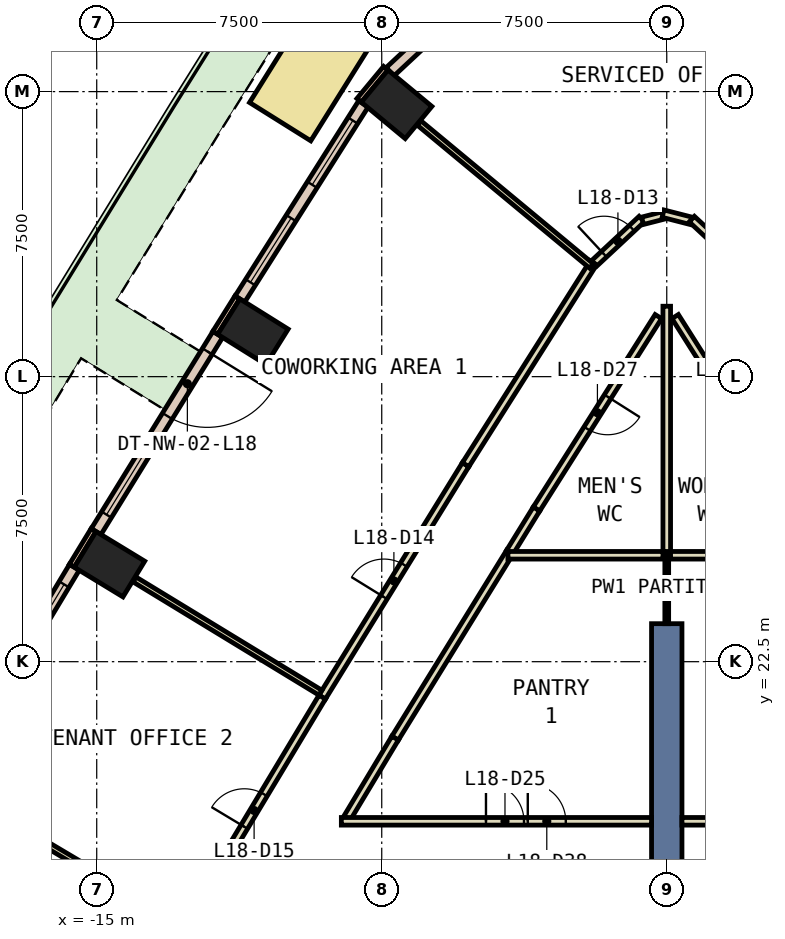
"""IFC4 building model, lengths in metres.
Left out: names, types, materials, properties, quantities, classifications, styles, units other than length and angle.
Written with IfcOpenShell. Run it as: python <this file> out.ifc"""

import sys

from ifc_helpers import new_model, si_unit, direction, frame, frame_2d, origin, origin_2d, place, context, subcontext, project, spatial, rectangle, extrude, element, fill, save


model = new_model("IFC4")
c1 = context("Model", 3, precision=1e-05, world=origin(), true_north=direction((0.0, 1.0)))
c2 = subcontext(c1, "Body", "Model", "MODEL_VIEW")
j1 = project(units=[si_unit("LENGTHUNIT", "METRE"), si_unit("PLANEANGLEUNIT", "RADIAN")], contexts=[c1])
p1 = place(None, origin())
s1 = spatial("IfcSite", under=j1, at=p1, CompositionType="ELEMENT")
p2 = place(p1, origin())
s2 = spatial("IfcBuilding", under=s1, at=p2, CompositionType="ELEMENT")
p3 = place(p2, frame((0.0, 0.0, 86.6)))
s3 = spatial("IfcBuildingStorey", under=s2, at=p3, CompositionType="ELEMENT", Elevation=86.6)
for number, where, z_axis, x_axis in (
    (1, (-7.109, 37.166, 0.0), (0.0, 0.0, 1.0), (0.638, 0.77, 0.0)),
    (2, (-10.89, 31.182, 0.0), (0.0, 0.0, 1.0), (0.53, 0.848, 0.0)),
    (3, (-14.664, 25.065, 0.0), (0.0, 0.0, 1.0), (0.52, 0.854, 0.0)),
):
    element("IfcColumn", number, at=place(p3, frame(where, z_axis=z_axis, x_axis=x_axis)), inside=s3, PredefinedType="COLUMN", context=c2, shape_type="SweptSolid", body=[
        extrude(rectangle(XDim=1.1, YDim=1.5, at=origin_2d()), origin(), (0.0, 0.0, 1.0), 3.8),
    ])
p4 = place(p3, frame((0.0, 14.5, -0.6), z_axis=(0.0, 0.0, 1.0), x_axis=(0.0, 1.0, 0.0)))
e4 = element("IfcWall", 4, at=p4, inside=s3, PredefinedType="SHEAR", context=c2, shape_type="SweptSolid", body=[
    extrude(rectangle(XDim=9.0, YDim=0.8, at=frame_2d((4.5, 0.0))), origin(), (0.0, 0.0, 1.0), 4.4),
])
p5 = place(p3, frame((-7.393, 38.116, 0.0), z_axis=(0.0, 0.0, 1.0), x_axis=(-0.638544483078, -0.769584916127, 0.0)))
e5 = element("IfcWall", 5, at=p5, inside=s3, PredefinedType="STANDARD", context=c2, shape_type="SweptSolid", body=[
    extrude(rectangle(XDim=1.099, YDim=0.15, at=frame_2d((0.55, 0.0))), origin(), (0.0, 0.0, 1.0), 3.8),
])
p6 = place(p3, frame((-11.298, 32.086, 0.0), z_axis=(0.0, 0.0, 1.0), x_axis=(-0.52997899071, -0.848010771987, 0.0)))
e6 = element("IfcWall", 6, at=p6, inside=s3, PredefinedType="STANDARD", context=c2, shape_type="SweptSolid", body=[
    extrude(rectangle(XDim=1.1, YDim=0.15, at=frame_2d((0.55, 0.0))), origin(), (0.0, 0.0, 1.0), 3.8),
])
p7 = place(p3, frame((-15.083, 25.964, 0.0), z_axis=(0.0, 0.0, 1.0), x_axis=(-0.51977099384, -0.854305632641, 0.0)))
e7 = element("IfcWall", 7, at=p7, inside=s3, PredefinedType="STANDARD", context=c2, shape_type="SweptSolid", body=[
    extrude(rectangle(XDim=1.101, YDim=0.15, at=frame_2d((0.55, 0.0))), origin(), (0.0, 0.0, 1.0), 3.8),
])
p8 = place(p3, frame((-4.786, 40.347, 0.0), z_axis=(0.0, 0.0, 1.0), x_axis=(-0.731614451791, -0.681718632525, 0.0)))
e8 = element("IfcWall", 8, at=p8, inside=s3, PredefinedType="STANDARD", context=c2, shape_type="SweptSolid", body=[
    extrude(rectangle(XDim=3.41, YDim=0.3, at=frame_2d((1.705, 0.0))), origin(), (0.0, 0.0, 1.0), 3.8),
])
p9 = place(p8, frame((1.005, 0.0, 0.9)))
e9 = element("IfcOpeningElement", 9, at=p9, cuts=e8, PredefinedType="OPENING", context=c2, shape_type="SweptSolid", body=[
    extrude(rectangle(XDim=1.4, YDim=2.6, at=frame_2d((0.7, 1.3))), frame((0.0, 0.16, 0.0), z_axis=(0.0, -1.0, 0.0), x_axis=(1.0, 0.0, 0.0)), (0.0, 0.0, 1.0), 0.32),
])
p10 = place(p3, frame((-7.982, 37.177, 0.0), z_axis=(0.0, 0.0, 1.0), x_axis=(-0.534869492536, -0.84493468739, 0.0)))
e10 = element("IfcWall", 10, at=p10, inside=s3, PredefinedType="STANDARD", context=c2, shape_type="SweptSolid", body=[
    extrude(rectangle(XDim=6.076, YDim=0.3, at=frame_2d((3.038, 0.0))), origin(), (0.0, 0.0, 1.0), 3.8),
])
p11 = place(p10, frame((0.519, 0.0, 0.9)))
e11 = element("IfcOpeningElement", 11, at=p11, cuts=e10, PredefinedType="OPENING", context=c2, shape_type="SweptSolid", body=[
    extrude(rectangle(XDim=2.0, YDim=2.6, at=frame_2d((1.0, 1.3))), frame((0.0, 0.16, 0.0), z_axis=(0.0, -1.0, 0.0), x_axis=(1.0, 0.0, 0.0)), (0.0, 0.0, 1.0), 0.32),
])
p12 = place(p10, frame((3.557, 0.0, 0.9)))
e12 = element("IfcOpeningElement", 12, at=p12, cuts=e10, PredefinedType="OPENING", context=c2, shape_type="SweptSolid", body=[
    extrude(rectangle(XDim=2.0, YDim=2.6, at=frame_2d((1.0, 1.3))), frame((0.0, 0.16, 0.0), z_axis=(0.0, -1.0, 0.0), x_axis=(1.0, 0.0, 0.0)), (0.0, 0.0, 1.0), 0.32),
])
p13 = place(p3, frame((-11.814, 31.112, 0.0), z_axis=(0.0, 0.0, 1.0), x_axis=(-0.525204788886, -0.850975869065, 0.0)))
e13 = element("IfcWall", 13, at=p13, inside=s3, PredefinedType="STANDARD", context=c2, shape_type="SweptSolid", body=[
    extrude(rectangle(XDim=6.099, YDim=0.3, at=frame_2d((3.049, 0.0))), origin(), (0.0, 0.0, 1.0), 3.8),
])
p14 = place(p13, frame((0.525, 0.0, 0.0)))
e14 = element("IfcOpeningElement", 14, at=p14, cuts=e13, PredefinedType="OPENING", context=c2, shape_type="SweptSolid", body=[
    extrude(rectangle(XDim=2.0, YDim=2.4, at=frame_2d((1.0, 1.2))), frame((0.0, 0.16, 0.0), z_axis=(0.0, -1.0, 0.0), x_axis=(1.0, 0.0, 0.0)), (0.0, 0.0, 1.0), 0.32),
])
p15 = place(p13, frame((3.574, 0.0, 0.9)))
e15 = element("IfcOpeningElement", 15, at=p15, cuts=e13, PredefinedType="OPENING", context=c2, shape_type="SweptSolid", body=[
    extrude(rectangle(XDim=2.0, YDim=2.6, at=frame_2d((1.0, 1.3))), frame((0.0, 0.16, 0.0), z_axis=(0.0, -1.0, 0.0), x_axis=(1.0, 0.0, 0.0)), (0.0, 0.0, 1.0), 0.32),
])
p16 = place(p3, frame((-15.588, 24.984, 0.0), z_axis=(0.0, 0.0, 1.0), x_axis=(-0.515102053092, -0.857128855483, 0.0)))
e16 = element("IfcWall", 16, at=p16, inside=s3, PredefinedType="STANDARD", context=c2, shape_type="SweptSolid", body=[
    extrude(rectangle(XDim=6.098, YDim=0.3, at=frame_2d((3.049, 0.0))), origin(), (0.0, 0.0, 1.0), 3.8),
])
p17 = place(p16, frame((0.525, 0.0, 0.9)))
e17 = element("IfcOpeningElement", 17, at=p17, cuts=e16, PredefinedType="OPENING", context=c2, shape_type="SweptSolid", body=[
    extrude(rectangle(XDim=2.0, YDim=2.6, at=frame_2d((1.0, 1.3))), frame((0.0, 0.16, 0.0), z_axis=(0.0, -1.0, 0.0), x_axis=(1.0, 0.0, 0.0)), (0.0, 0.0, 1.0), 0.32),
])
p18 = place(p16, frame((3.574, 0.0, 0.9)))
e18 = element("IfcOpeningElement", 18, at=p18, cuts=e16, PredefinedType="OPENING", context=c2, shape_type="SweptSolid", body=[
    extrude(rectangle(XDim=2.0, YDim=2.6, at=frame_2d((1.0, 1.3))), frame((0.0, 0.16, 0.0), z_axis=(0.0, -1.0, 0.0), x_axis=(1.0, 0.0, 0.0)), (0.0, 0.0, 1.0), 0.32),
])
p19 = place(p3, frame((-7.363, 41.2, 0.0), z_axis=(0.0, 0.0, 1.0), x_axis=(-0.530433826126, -0.847726345056, 0.0)))
e19 = element("IfcWall", 19, at=p19, inside=s3, PredefinedType="STANDARD", context=c2, shape_type="SweptSolid", body=[
    extrude(rectangle(XDim=5.298, YDim=1.9, at=frame_2d((2.649, 0.0))), origin(), (0.0, 0.0, 1.0), 0.8),
])
p20 = place(p3, frame((-4.126, 25.385, 0.0), z_axis=(0.0, 0.0, 1.0), x_axis=(-0.525162244663, -0.851002125016, 0.0)))
e20 = element("IfcWall", 20, at=p20, inside=s3, PredefinedType="PARTITIONING", context=c2, shape_type="SweptSolid", body=[
    extrude(rectangle(XDim=5.754, YDim=0.2, at=frame_2d((2.877, 0.0))), origin(), (0.0, 0.0, 1.0), 3.8),
])
p21 = place(p3, frame((-7.148, 20.488, 0.0), z_axis=(0.0, 0.0, 1.0), x_axis=(-0.515008089027, -0.857185317325, 0.0)))
e21 = element("IfcWall", 21, at=p21, inside=s3, PredefinedType="PARTITIONING", context=c2, shape_type="SweptSolid", body=[
    extrude(rectangle(XDim=2.452, YDim=0.2, at=frame_2d((1.226, 0.0))), origin(), (0.0, 0.0, 1.0), 3.8),
])
p22 = place(p3, frame((3.428, 26.517, 0.0), z_axis=(0.0, 0.0, 1.0), x_axis=(-0.535034639024, 0.844830122003, 0.0)))
e22 = element("IfcWall", 22, at=p22, inside=s3, PredefinedType="PARTITIONING", context=c2, shape_type="SweptSolid", body=[
    extrude(rectangle(XDim=5.994, YDim=0.2, at=frame_2d((2.997, 0.0))), origin(), (0.0, 0.0, 1.0), 3.8),
])
p23 = place(p22, frame((2.497, 0.0, 0.0)))
e23 = element("IfcOpeningElement", 23, at=p23, cuts=e22, PredefinedType="OPENING", context=c2, shape_type="SweptSolid", body=[
    extrude(rectangle(XDim=1.0, YDim=2.1, at=frame_2d((0.5, 1.05))), frame((0.0, 0.11, 0.0), z_axis=(0.0, -1.0, 0.0), x_axis=(1.0, 0.0, 0.0)), (0.0, 0.0, 1.0), 0.22),
])
p24 = place(p3, frame((-0.221, 31.581, 0.0), z_axis=(0.0, 0.0, 1.0), x_axis=(-0.535034639024, -0.844830122003, 0.0)))
e24 = element("IfcWall", 24, at=p24, inside=s3, PredefinedType="PARTITIONING", context=c2, shape_type="SweptSolid", body=[
    extrude(rectangle(XDim=5.994, YDim=0.2, at=frame_2d((2.997, 0.0))), origin(), (0.0, 0.0, 1.0), 3.8),
])
p25 = place(p24, frame((2.497, 0.0, 0.0)))
e25 = element("IfcOpeningElement", 25, at=p25, cuts=e24, PredefinedType="OPENING", context=c2, shape_type="SweptSolid", body=[
    extrude(rectangle(XDim=1.0, YDim=2.1, at=frame_2d((0.5, 1.05))), frame((0.0, 0.11, 0.0), z_axis=(0.0, -1.0, 0.0), x_axis=(1.0, 0.0, 0.0)), (0.0, 0.0, 1.0), 0.22),
])
p26 = place(p3, frame((-3.428, 26.517, 0.0), z_axis=(0.0, 0.0, 1.0), x_axis=(-0.524824420869, -0.851210507019, 0.0)))
e26 = element("IfcWall", 26, at=p26, inside=s3, PredefinedType="PARTITIONING", context=c2, shape_type="SweptSolid", body=[
    extrude(rectangle(XDim=1.33, YDim=0.2, at=frame_2d((0.665, 0.0))), origin(), (0.0, 0.0, 1.0), 3.8),
])
p27 = place(p3, frame((-1.909, 32.981, 0.0), z_axis=(0.0, 0.0, 1.0), x_axis=(0.731549606095, 0.681788217721, 0.0)))
e27 = element("IfcWall", 27, at=p27, inside=s3, PredefinedType="PARTITIONING", context=c2, shape_type="SweptSolid", body=[
    extrude(rectangle(XDim=1.707, YDim=0.2, at=frame_2d((0.854, 0.0))), origin(), (0.0, 0.0, 1.0), 3.8),
])
p28 = place(p27, frame((0.353, 0.0, 0.0)))
e28 = element("IfcOpeningElement", 28, at=p28, cuts=e27, PredefinedType="OPENING", context=c2, shape_type="SweptSolid", body=[
    extrude(rectangle(XDim=1.0, YDim=2.1, at=frame_2d((0.5, 1.05))), frame((0.0, 0.11, 0.0), z_axis=(0.0, -1.0, 0.0), x_axis=(1.0, 0.0, 0.0)), (0.0, 0.0, 1.0), 0.22),
])
p29 = place(p3, frame((-0.637, 34.101, 0.0), z_axis=(0.0, 0.0, 1.0), x_axis=(0.968893133717, 0.247479484878, 0.0)))
e29 = element("IfcWall", 29, at=p29, inside=s3, PredefinedType="PARTITIONING", context=c2, shape_type="SweptSolid", body=[
    extrude(rectangle(XDim=0.557, YDim=0.2, at=frame_2d((0.279, 0.0))), origin(), (0.0, 0.0, 1.0), 3.8),
])
p30 = place(p3, frame((-0.097, 34.289, 0.0), z_axis=(0.0, 0.0, 1.0), x_axis=(0.96872347969, -0.248142740972, 0.0)))
e30 = element("IfcWall", 30, at=p30, inside=s3, PredefinedType="PARTITIONING", context=c2, shape_type="SweptSolid", body=[
    extrude(rectangle(XDim=0.758, YDim=0.2, at=frame_2d((0.379, 0.0))), origin(), (0.0, 0.0, 1.0), 3.8),
])
p31 = place(p3, frame((0.66, 34.145, 0.0), z_axis=(0.0, 0.0, 1.0), x_axis=(0.731549606095, -0.681788217721, 0.0)))
e31 = element("IfcWall", 31, at=p31, inside=s3, PredefinedType="PARTITIONING", context=c2, shape_type="SweptSolid", body=[
    extrude(rectangle(XDim=1.707, YDim=0.2, at=frame_2d((0.854, 0.0))), origin(), (0.0, 0.0, 1.0), 3.8),
])
p32 = place(p3, frame((-9.067, 21.568, 0.0), z_axis=(0.0, 0.0, 1.0), x_axis=(0.525131931126, 0.851020831068, 0.0)))
e32 = element("IfcWall", 32, at=p32, inside=s3, PredefinedType="PARTITIONING", context=c2, shape_type="SweptSolid", body=[
    extrude(rectangle(XDim=7.187, YDim=0.2, at=frame_2d((3.593, 0.0))), origin(), (0.0, 0.0, 1.0), 3.8),
])
p33 = place(p32, frame((3.093, 0.0, 0.0)))
e33 = element("IfcOpeningElement", 33, at=p33, cuts=e32, PredefinedType="OPENING", context=c2, shape_type="SweptSolid", body=[
    extrude(rectangle(XDim=1.0, YDim=2.1, at=frame_2d((0.5, 1.05))), frame((0.0, 0.11, 0.0), z_axis=(0.0, -1.0, 0.0), x_axis=(1.0, 0.0, 0.0)), (0.0, 0.0, 1.0), 0.22),
])
p34 = place(p3, frame((-5.293, 27.684, 0.0), z_axis=(0.0, 0.0, 1.0), x_axis=(0.534952324147, 0.844882246759, 0.0)))
e34 = element("IfcWall", 34, at=p34, inside=s3, PredefinedType="PARTITIONING", context=c2, shape_type="SweptSolid", body=[
    extrude(rectangle(XDim=6.288, YDim=0.2, at=frame_2d((3.144, 0.0))), origin(), (0.0, 0.0, 1.0), 3.8),
])
p35 = place(p3, frame((-12.728, 15.473, 0.0), z_axis=(0.0, 0.0, 1.0), x_axis=(0.515010673306, 0.857183764651, 0.0)))
e35 = element("IfcWall", 35, at=p35, inside=s3, PredefinedType="PARTITIONING", context=c2, shape_type="SweptSolid", body=[
    extrude(rectangle(XDim=7.111, YDim=0.2, at=frame_2d((3.555, 0.0))), origin(), (0.0, 0.0, 1.0), 3.8),
])
p36 = place(p35, frame((3.13, 0.0, 0.0)))
e36 = element("IfcOpeningElement", 36, at=p36, cuts=e35, PredefinedType="OPENING", context=c2, shape_type="SweptSolid", body=[
    extrude(rectangle(XDim=1.0, YDim=2.1, at=frame_2d((0.5, 1.05))), frame((0.0, 0.11, 0.0), z_axis=(0.0, -1.0, 0.0), x_axis=(1.0, 0.0, 0.0)), (0.0, 0.0, 1.0), 0.22),
])
p37 = place(p3, frame((0.4, 18.3, 0.0), z_axis=(0.0, 0.0, 1.0), x_axis=(1.0, 0.0, 0.0)))
e37 = element("IfcWall", 37, at=p37, inside=s3, PredefinedType="PARTITIONING", context=c2, shape_type="SweptSolid", body=[
    extrude(rectangle(XDim=8.163, YDim=0.2, at=frame_2d((4.082, 0.0))), origin(), (0.0, 0.0, 1.0), 3.8),
])
p38 = place(p37, frame((3.356, 0.0, 0.0)))
e38 = element("IfcOpeningElement", 38, at=p38, cuts=e37, PredefinedType="OPENING", context=c2, shape_type="SweptSolid", body=[
    extrude(rectangle(XDim=1.0, YDim=2.1, at=frame_2d((0.5, 1.05))), frame((0.0, 0.11, 0.0), z_axis=(0.0, -1.0, 0.0), x_axis=(1.0, 0.0, 0.0)), (0.0, 0.0, 1.0), 0.22),
])
p39 = place(p37, frame((4.456, 0.0, 0.0)))
e39 = element("IfcOpeningElement", 39, at=p39, cuts=e37, PredefinedType="OPENING", context=c2, shape_type="SweptSolid", body=[
    extrude(rectangle(XDim=1.0, YDim=2.1, at=frame_2d((0.5, 1.05))), frame((0.0, 0.11, 0.0), z_axis=(0.0, -1.0, 0.0), x_axis=(1.0, 0.0, 0.0)), (0.0, 0.0, 1.0), 0.22),
])
p40 = place(p3, frame((-8.563, 18.3, 0.0), z_axis=(0.0, 0.0, 1.0), x_axis=(1.0, 0.0, 0.0)))
e40 = element("IfcWall", 40, at=p40, inside=s3, PredefinedType="PARTITIONING", context=c2, shape_type="SweptSolid", body=[
    extrude(rectangle(XDim=8.163, YDim=0.2, at=frame_2d((4.082, 0.0))), origin(), (0.0, 0.0, 1.0), 3.8),
])
p41 = place(p40, frame((3.806, 0.0, 0.0)))
e41 = element("IfcOpeningElement", 41, at=p41, cuts=e40, PredefinedType="OPENING", context=c2, shape_type="SweptSolid", body=[
    extrude(rectangle(XDim=1.0, YDim=2.1, at=frame_2d((0.5, 1.05))), frame((0.0, 0.11, 0.0), z_axis=(0.0, -1.0, 0.0), x_axis=(1.0, 0.0, 0.0)), (0.0, 0.0, 1.0), 0.22),
])
p42 = place(p40, frame((4.906, 0.0, 0.0)))
e42 = element("IfcOpeningElement", 42, at=p42, cuts=e40, PredefinedType="OPENING", context=c2, shape_type="SweptSolid", body=[
    extrude(rectangle(XDim=1.0, YDim=2.1, at=frame_2d((0.5, 1.05))), frame((0.0, 0.11, 0.0), z_axis=(0.0, -1.0, 0.0), x_axis=(1.0, 0.0, 0.0)), (0.0, 0.0, 1.0), 0.22),
])
p43 = place(p3, frame((0.0, 23.5, 0.0), z_axis=(0.0, 0.0, 1.0), x_axis=(0.0, 1.0, 0.0)))
e43 = element("IfcWall", 43, at=p43, inside=s3, PredefinedType="PARTITIONING", context=c2, shape_type="SweptSolid", body=[
    extrude(rectangle(XDim=1.9, YDim=0.1, at=frame_2d((0.95, 0.0))), origin(), (0.0, 0.0, 1.0), 3.8),
])
for number, where, z_axis, x_axis in (
    (44, (0.1, 25.3, 0.0), (0.0, 0.0, 1.0), (1.0, 0.0, 0.0)),
    (45, (-4.179, 25.3, 0.0), (0.0, 0.0, 1.0), (1.0, 0.0, 0.0)),
):
    element("IfcWall", number, at=place(p3, frame(where, z_axis=z_axis, x_axis=x_axis)), inside=s3, PredefinedType="PARTITIONING", context=c2, shape_type="SweptSolid", body=[
        extrude(rectangle(XDim=4.079, YDim=0.2, at=frame_2d((2.04, 0.0))), origin(), (0.0, 0.0, 1.0), 3.8),
    ])
p44 = place(p3, frame((0.0, 25.4, 0.0), z_axis=(0.0, 0.0, 1.0), x_axis=(0.0, 1.0, 0.0)))
e46 = element("IfcWall", 46, at=p44, inside=s3, PredefinedType="PARTITIONING", context=c2, shape_type="SweptSolid", body=[
    extrude(rectangle(XDim=6.453, YDim=0.2, at=frame_2d((3.227, 0.0))), origin(), (0.0, 0.0, 1.0), 3.8),
])
p45 = place(p3, frame((-1.982, 32.913, 0.0), z_axis=(0.0, 0.0, 1.0), x_axis=(-0.769679976891, 0.638429896835, 0.0)))
e47 = element("IfcWall", 47, at=p45, inside=s3, PredefinedType="PARTITIONING", context=c2, shape_type="SweptSolid", body=[
    extrude(rectangle(XDim=5.891, YDim=0.15, at=frame_2d((2.946, 0.0))), origin(), (0.0, 0.0, 1.0), 3.8),
])
p46 = place(p3, frame((-9.113, 21.684, 0.0), z_axis=(0.0, 0.0, 1.0), x_axis=(-0.854075097122, 0.520149717367, 0.0)))
e48 = element("IfcWall", 48, at=p46, inside=s3, PredefinedType="PARTITIONING", context=c2, shape_type="SweptSolid", body=[
    extrude(rectangle(XDim=5.729, YDim=0.15, at=frame_2d((2.865, 0.0))), origin(), (0.0, 0.0, 1.0), 3.8),
])
p47 = place(p3, frame((-12.776, 15.589, 0.0), z_axis=(0.0, 0.0, 1.0), x_axis=(-0.860225086153, 0.509914503768, 0.0)))
e49 = element("IfcWall", 49, at=p47, inside=s3, PredefinedType="PARTITIONING", context=c2, shape_type="SweptSolid", body=[
    extrude(rectangle(XDim=5.73, YDim=0.15, at=frame_2d((2.865, 0.0))), origin(), (0.0, 0.0, 1.0), 3.8),
])
p48 = place(p11, origin())
e50 = element("IfcWindow", 50, at=p48, inside=s3, PartitioningType="SINGLE_PANEL", PredefinedType="WINDOW", context=c2, shape_type="SweptSolid", body=[
    extrude(rectangle(XDim=2.0, YDim=2.6, at=frame_2d((1.0, 1.3))), frame((0.0, 0.03, 0.0), z_axis=(0.0, -1.0, 0.0), x_axis=(1.0, 0.0, 0.0)), (0.0, 0.0, 1.0), 0.06),
])
fill(e11, e50)
p49 = place(p12, origin())
e51 = element("IfcWindow", 51, at=p49, inside=s3, PartitioningType="SINGLE_PANEL", PredefinedType="WINDOW", context=c2, shape_type="SweptSolid", body=[
    extrude(rectangle(XDim=2.0, YDim=2.6, at=frame_2d((1.0, 1.3))), frame((0.0, 0.03, 0.0), z_axis=(0.0, -1.0, 0.0), x_axis=(1.0, 0.0, 0.0)), (0.0, 0.0, 1.0), 0.06),
])
fill(e12, e51)
p50 = place(p14, origin())
e52 = element("IfcDoor", 52, at=p50, inside=s3, OperationType="SLIDING_TO_LEFT", PredefinedType="DOOR", context=c2, shape_type="SweptSolid", body=[
    extrude(rectangle(XDim=2.0, YDim=2.4, at=frame_2d((1.0, 1.2))), frame((0.0, 0.025, 0.0), z_axis=(0.0, -1.0, 0.0), x_axis=(1.0, 0.0, 0.0)), (0.0, 0.0, 1.0), 0.05),
])
fill(e14, e52)
p51 = place(p15, origin())
e53 = element("IfcWindow", 53, at=p51, inside=s3, PartitioningType="SINGLE_PANEL", PredefinedType="WINDOW", context=c2, shape_type="SweptSolid", body=[
    extrude(rectangle(XDim=2.0, YDim=2.6, at=frame_2d((1.0, 1.3))), frame((0.0, 0.03, 0.0), z_axis=(0.0, -1.0, 0.0), x_axis=(1.0, 0.0, 0.0)), (0.0, 0.0, 1.0), 0.06),
])
fill(e15, e53)
p52 = place(p17, origin())
e54 = element("IfcWindow", 54, at=p52, inside=s3, PartitioningType="SINGLE_PANEL", PredefinedType="WINDOW", context=c2, shape_type="SweptSolid", body=[
    extrude(rectangle(XDim=2.0, YDim=2.6, at=frame_2d((1.0, 1.3))), frame((0.0, 0.03, 0.0), z_axis=(0.0, -1.0, 0.0), x_axis=(1.0, 0.0, 0.0)), (0.0, 0.0, 1.0), 0.06),
])
fill(e17, e54)
p53 = place(p28, origin())
e55 = element("IfcDoor", 55, at=p53, inside=s3, OperationType="SINGLE_SWING_RIGHT", PredefinedType="DOOR", context=c2, shape_type="SweptSolid", body=[
    extrude(rectangle(XDim=1.0, YDim=2.1, at=frame_2d((0.5, 1.05))), frame((0.0, 0.025, 0.0), z_axis=(0.0, -1.0, 0.0), x_axis=(1.0, 0.0, 0.0)), (0.0, 0.0, 1.0), 0.05),
])
fill(e28, e55)
p54 = place(p33, origin())
e56 = element("IfcDoor", 56, at=p54, inside=s3, OperationType="SINGLE_SWING_RIGHT", PredefinedType="DOOR", context=c2, shape_type="SweptSolid", body=[
    extrude(rectangle(XDim=1.0, YDim=2.1, at=frame_2d((0.5, 1.05))), frame((0.0, 0.025, 0.0), z_axis=(0.0, -1.0, 0.0), x_axis=(1.0, 0.0, 0.0)), (0.0, 0.0, 1.0), 0.05),
])
fill(e33, e56)
p55 = place(p36, origin())
e57 = element("IfcDoor", 57, at=p55, inside=s3, OperationType="SINGLE_SWING_LEFT", PredefinedType="DOOR", context=c2, shape_type="SweptSolid", body=[
    extrude(rectangle(XDim=1.0, YDim=2.1, at=frame_2d((0.5, 1.05))), frame((0.0, 0.025, 0.0), z_axis=(0.0, -1.0, 0.0), x_axis=(1.0, 0.0, 0.0)), (0.0, 0.0, 1.0), 0.05),
])
fill(e36, e57)
p56 = place(p41, origin())
e58 = element("IfcDoor", 58, at=p56, inside=s3, OperationType="SINGLE_SWING_RIGHT", PredefinedType="DOOR", context=c2, shape_type="SweptSolid", body=[
    extrude(rectangle(XDim=1.0, YDim=2.1, at=frame_2d((0.5, 1.05))), frame((0.0, 0.025, 0.0), z_axis=(0.0, -1.0, 0.0), x_axis=(1.0, 0.0, 0.0)), (0.0, 0.0, 1.0), 0.05),
])
fill(e41, e58)
p57 = place(p25, origin())
e59 = element("IfcDoor", 59, at=p57, inside=s3, OperationType="SINGLE_SWING_LEFT", PredefinedType="DOOR", context=c2, shape_type="SweptSolid", body=[
    extrude(rectangle(XDim=1.0, YDim=2.1, at=frame_2d((0.5, 1.05))), frame((0.0, 0.025, 0.0), z_axis=(0.0, -1.0, 0.0), x_axis=(1.0, 0.0, 0.0)), (0.0, 0.0, 1.0), 0.05),
])
fill(e25, e59)
p58 = place(p42, origin())
e60 = element("IfcDoor", 60, at=p58, inside=s3, OperationType="SINGLE_SWING_RIGHT", PredefinedType="DOOR", context=c2, shape_type="SweptSolid", body=[
    extrude(rectangle(XDim=1.0, YDim=2.1, at=frame_2d((0.5, 1.05))), frame((0.0, 0.025, 0.0), z_axis=(0.0, -1.0, 0.0), x_axis=(1.0, 0.0, 0.0)), (0.0, 0.0, 1.0), 0.05),
])
fill(e42, e60)
save(model, sys.argv[1])
